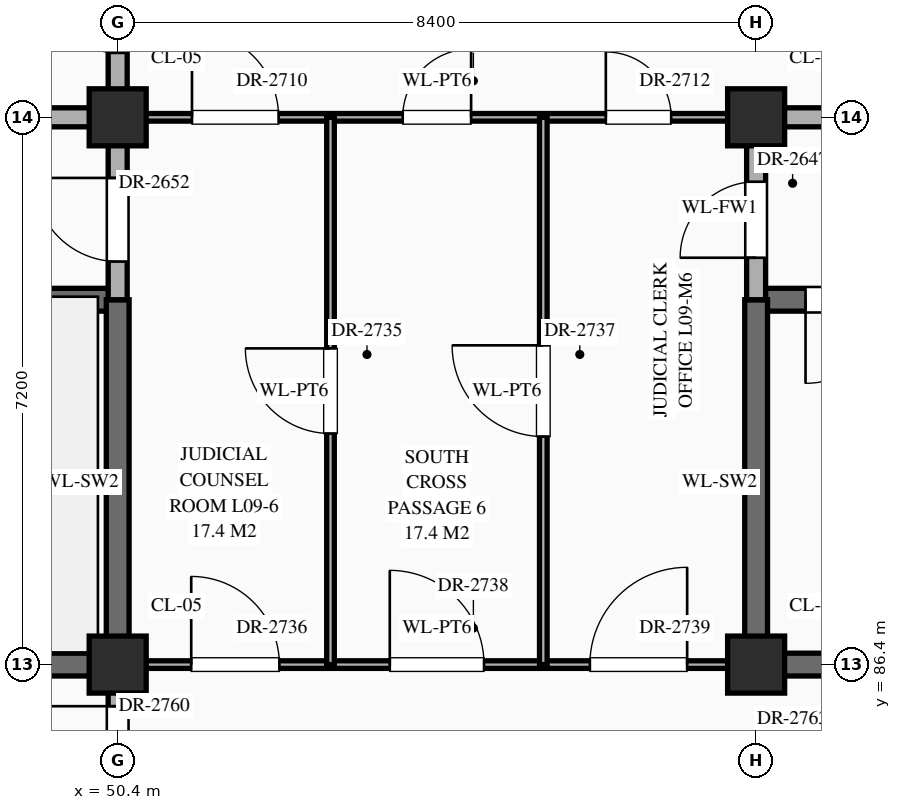
"""IFC4 building model, lengths in metres.
Left out: names, types, materials, properties, quantities, classifications, styles, units other than length and angle.
Written with IfcOpenShell. Run it as: python <this file> out.ifc"""

import sys

from ifc_helpers import new_model, si_unit, direction, frame, frame_2d, origin, origin_2d, place, context, subcontext, project, spatial, rectangle, extrude, element, fill, save


model = new_model("IFC4")
c1 = context("Model", 3, precision=1e-05, world=origin(), true_north=direction((0.0, 1.0)))
c2 = subcontext(c1, "Body", "Model", "MODEL_VIEW")
j1 = project(units=[si_unit("LENGTHUNIT", "METRE"), si_unit("PLANEANGLEUNIT", "RADIAN")], contexts=[c1])
p1 = place(None, origin())
s1 = spatial("IfcSite", under=j1, at=p1, CompositionType="ELEMENT")
p2 = place(p1, origin())
s2 = spatial("IfcBuilding", under=s1, at=p2, CompositionType="ELEMENT")
p3 = place(p2, frame((0.0, 0.0, 39.3)))
s3 = spatial("IfcBuildingStorey", under=s2, at=p3, CompositionType="ELEMENT", Elevation=39.3)
for number, where, z_axis, x_axis in (
    (1, (50.4, 86.4, 0.0), (0.0, 0.0, 1.0), (1.0, 0.0, 0.0)),
    (2, (50.4, 93.6, 0.0), (0.0, 0.0, 1.0), (1.0, 0.0, 0.0)),
    (3, (58.8, 86.4, 0.0), (0.0, 0.0, 1.0), (1.0, 0.0, 0.0)),
    (4, (58.8, 93.6, 0.0), (0.0, 0.0, 1.0), (1.0, 0.0, 0.0)),
):
    element("IfcColumn", number, at=place(p3, frame(where, z_axis=z_axis, x_axis=x_axis)), inside=s3, PredefinedType="COLUMN", context=c2, shape_type="SweptSolid", body=[
        extrude(rectangle(XDim=0.75, YDim=0.75, at=origin_2d()), origin(), (0.0, 0.0, 1.0), 4.2),
    ])
p4 = place(p3, frame((42.04, 86.4, 0.0), z_axis=(0.0, 0.0, 1.0), x_axis=(1.0, 0.0, 0.0)))
e5 = element("IfcWall", 5, at=p4, inside=s3, PredefinedType="SHEAR", context=c2, shape_type="SweptSolid", body=[
    extrude(rectangle(XDim=8.36, YDim=0.3, at=frame_2d((4.18, 0.0))), origin(), (0.0, 0.0, 1.0), 3.95),
])
p5 = place(p3, frame((50.4, 86.4, 0.0), z_axis=(0.0, 0.0, 1.0), x_axis=(1.0, 0.0, 0.0)))
e6 = element("IfcWall", 6, at=p5, inside=s3, PredefinedType="STANDARD", context=c2, shape_type="SweptSolid", body=[
    extrude(rectangle(XDim=8.4, YDim=0.1, at=frame_2d((4.2, 0.0))), origin(), (0.0, 0.0, 1.0), 3.1),
])
p6 = place(p5, frame((0.968, 0.0, 0.0)))
e7 = element("IfcOpeningElement", 7, at=p6, cuts=e6, PredefinedType="OPENING", context=c2, shape_type="SweptSolid", body=[
    extrude(rectangle(XDim=1.16, YDim=2.3, at=frame_2d((0.58, 1.15))), frame((0.0, 0.062, 0.0), z_axis=(0.0, -1.0, 0.0), x_axis=(1.0, 0.0, 0.0)), (0.0, 0.0, 1.0), 0.124),
])
p7 = place(p5, frame((3.58, 0.0, 0.0)))
e8 = element("IfcOpeningElement", 8, at=p7, cuts=e6, PredefinedType="OPENING", context=c2, shape_type="SweptSolid", body=[
    extrude(rectangle(XDim=1.24, YDim=2.3, at=frame_2d((0.62, 1.15))), frame((0.0, 0.062, 0.0), z_axis=(0.0, -1.0, 0.0), x_axis=(1.0, 0.0, 0.0)), (0.0, 0.0, 1.0), 0.124),
])
p8 = place(p5, frame((6.212, 0.0, 0.0)))
e9 = element("IfcOpeningElement", 9, at=p8, cuts=e6, PredefinedType="OPENING", context=c2, shape_type="SweptSolid", body=[
    extrude(rectangle(XDim=1.28, YDim=2.35, at=frame_2d((0.64, 1.175))), frame((0.0, 0.062, 0.0), z_axis=(0.0, -1.0, 0.0), x_axis=(1.0, 0.0, 0.0)), (0.0, 0.0, 1.0), 0.124),
])
p9 = place(p3, frame((58.8, 86.4, 0.0), z_axis=(0.0, 0.0, 1.0), x_axis=(1.0, 0.0, 0.0)))
e10 = element("IfcWall", 10, at=p9, inside=s3, PredefinedType="SHEAR", context=c2, shape_type="SweptSolid", body=[
    extrude(rectangle(XDim=8.4, YDim=0.3, at=frame_2d((4.2, 0.0))), origin(), (0.0, 0.0, 1.0), 3.95),
])
p10 = place(p3, frame((42.04, 91.2, 0.0), z_axis=(0.0, 0.0, 1.0), x_axis=(1.0, 0.0, 0.0)))
e11 = element("IfcWall", 11, at=p10, inside=s3, PredefinedType="SHEAR", context=c2, shape_type="SweptSolid", body=[
    extrude(rectangle(XDim=8.36, YDim=0.3, at=frame_2d((4.18, 0.0))), origin(), (0.0, 0.0, 1.0), 3.95),
])
p11 = place(p10, frame((0.61, 0.0, 0.0)))
e12 = element("IfcOpeningElement", 12, at=p11, cuts=e11, PredefinedType="OPENING", context=c2, shape_type="SweptSolid", body=[
    extrude(rectangle(XDim=1.1, YDim=2.2, at=frame_2d((0.55, 1.1))), frame((0.0, 0.162, 0.0), z_axis=(0.0, -1.0, 0.0), x_axis=(1.0, 0.0, 0.0)), (0.0, 0.0, 1.0), 0.324),
])
p12 = place(p3, frame((58.8, 91.2, 0.0), z_axis=(0.0, 0.0, 1.0), x_axis=(1.0, 0.0, 0.0)))
e13 = element("IfcWall", 13, at=p12, inside=s3, PredefinedType="SHEAR", context=c2, shape_type="SweptSolid", body=[
    extrude(rectangle(XDim=8.4, YDim=0.3, at=frame_2d((4.2, 0.0))), origin(), (0.0, 0.0, 1.0), 3.95),
])
p13 = place(p12, frame((0.65, 0.0, 0.0)))
e14 = element("IfcOpeningElement", 14, at=p13, cuts=e13, PredefinedType="OPENING", context=c2, shape_type="SweptSolid", body=[
    extrude(rectangle(XDim=1.1, YDim=2.2, at=frame_2d((0.55, 1.1))), frame((0.0, 0.162, 0.0), z_axis=(0.0, -1.0, 0.0), x_axis=(1.0, 0.0, 0.0)), (0.0, 0.0, 1.0), 0.324),
])
p14 = place(p3, frame((42.04, 93.6, 0.0), z_axis=(0.0, 0.0, 1.0), x_axis=(1.0, 0.0, 0.0)))
e15 = element("IfcWall", 15, at=p14, inside=s3, PredefinedType="STANDARD", context=c2, shape_type="SweptSolid", body=[
    extrude(rectangle(XDim=8.36, YDim=0.25, at=frame_2d((4.18, 0.0))), origin(), (0.0, 0.0, 1.0), 3.1),
])
p15 = place(p14, frame((3.36, 0.0, 0.0)))
e16 = element("IfcOpeningElement", 16, at=p15, cuts=e15, PredefinedType="OPENING", context=c2, shape_type="SweptSolid", body=[
    extrude(rectangle(XDim=1.6, YDim=2.3, at=frame_2d((0.8, 1.15))), frame((0.0, 0.137, 0.0), z_axis=(0.0, -1.0, 0.0), x_axis=(1.0, 0.0, 0.0)), (0.0, 0.0, 1.0), 0.274),
])
p16 = place(p3, frame((50.4, 93.6, 0.0), z_axis=(0.0, 0.0, 1.0), x_axis=(1.0, 0.0, 0.0)))
e17 = element("IfcWall", 17, at=p16, inside=s3, PredefinedType="STANDARD", context=c2, shape_type="SweptSolid", body=[
    extrude(rectangle(XDim=8.4, YDim=0.1, at=frame_2d((4.2, 0.0))), origin(), (0.0, 0.0, 1.0), 3.1),
])
p17 = place(p16, frame((0.978, 0.0, 0.0)))
e18 = element("IfcOpeningElement", 18, at=p17, cuts=e17, PredefinedType="OPENING", context=c2, shape_type="SweptSolid", body=[
    extrude(rectangle(XDim=1.14, YDim=2.4, at=frame_2d((0.57, 1.2))), frame((0.0, 0.062, 0.0), z_axis=(0.0, -1.0, 0.0), x_axis=(1.0, 0.0, 0.0)), (0.0, 0.0, 1.0), 0.124),
])
p18 = place(p16, frame((3.75, 0.0, 0.0)))
e19 = element("IfcOpeningElement", 19, at=p18, cuts=e17, PredefinedType="OPENING", context=c2, shape_type="SweptSolid", body=[
    extrude(rectangle(XDim=0.9, YDim=2.15, at=frame_2d((0.45, 1.075))), frame((0.0, 0.062, 0.0), z_axis=(0.0, -1.0, 0.0), x_axis=(1.0, 0.0, 0.0)), (0.0, 0.0, 1.0), 0.124),
])
p19 = place(p16, frame((6.423, 0.0, 0.0)))
e20 = element("IfcOpeningElement", 20, at=p19, cuts=e17, PredefinedType="OPENING", context=c2, shape_type="SweptSolid", body=[
    extrude(rectangle(XDim=0.86, YDim=2.1, at=frame_2d((0.43, 1.05))), frame((0.0, 0.062, 0.0), z_axis=(0.0, -1.0, 0.0), x_axis=(1.0, 0.0, 0.0)), (0.0, 0.0, 1.0), 0.124),
])
p20 = place(p3, frame((58.8, 93.6, 0.0), z_axis=(0.0, 0.0, 1.0), x_axis=(1.0, 0.0, 0.0)))
e21 = element("IfcWall", 21, at=p20, inside=s3, PredefinedType="STANDARD", context=c2, shape_type="SweptSolid", body=[
    extrude(rectangle(XDim=8.4, YDim=0.25, at=frame_2d((4.2, 0.0))), origin(), (0.0, 0.0, 1.0), 3.1),
])
p21 = place(p20, frame((3.2, 0.0, 0.0)))
e22 = element("IfcOpeningElement", 22, at=p21, cuts=e21, PredefinedType="OPENING", context=c2, shape_type="SweptSolid", body=[
    extrude(rectangle(XDim=2.0, YDim=2.4, at=frame_2d((1.0, 1.2))), frame((0.0, 0.137, 0.0), z_axis=(0.0, -1.0, 0.0), x_axis=(1.0, 0.0, 0.0)), (0.0, 0.0, 1.0), 0.274),
])
p22 = place(p3, frame((50.4, 79.24, 0.0), z_axis=(0.0, 0.0, 1.0), x_axis=(0.0, 1.0, 0.0)))
e23 = element("IfcWall", 23, at=p22, inside=s3, PredefinedType="STANDARD", context=c2, shape_type="SweptSolid", body=[
    extrude(rectangle(XDim=7.16, YDim=0.25, at=frame_2d((3.58, 0.0))), origin(), (0.0, 0.0, 1.0), 3.2),
])
p23 = place(p22, frame((5.663, 0.0, 0.0)))
e24 = element("IfcOpeningElement", 24, at=p23, cuts=e23, PredefinedType="OPENING", context=c2, shape_type="SweptSolid", body=[
    extrude(rectangle(XDim=0.95, YDim=2.15, at=frame_2d((0.475, 1.075))), frame((0.0, 0.137, 0.0), z_axis=(0.0, -1.0, 0.0), x_axis=(1.0, 0.0, 0.0)), (0.0, 0.0, 1.0), 0.274),
])
p24 = place(p22, frame((2.083, 0.0, 0.0)))
e25 = element("IfcOpeningElement", 25, at=p24, cuts=e23, PredefinedType="OPENING", context=c2, shape_type="SweptSolid", body=[
    extrude(rectangle(XDim=1.5, YDim=2.25, at=frame_2d((0.75, 1.125))), frame((0.0, 0.137, 0.0), z_axis=(0.0, -1.0, 0.0), x_axis=(1.0, 0.0, 0.0)), (0.0, 0.0, 1.0), 0.274),
])
p25 = place(p3, frame((50.4, 86.4, 0.0), z_axis=(0.0, 0.0, 1.0), x_axis=(0.0, 1.0, 0.0)))
e26 = element("IfcWall", 26, at=p25, inside=s3, PredefinedType="SHEAR", context=c2, shape_type="SweptSolid", body=[
    extrude(rectangle(XDim=4.8, YDim=0.3, at=frame_2d((2.4, 0.0))), origin(), (0.0, 0.0, 1.0), 3.95),
])
p26 = place(p3, frame((50.4, 91.2, 0.0), z_axis=(0.0, 0.0, 1.0), x_axis=(0.0, 1.0, 0.0)))
e27 = element("IfcWall", 27, at=p26, inside=s3, PredefinedType="STANDARD", context=c2, shape_type="SweptSolid", body=[
    extrude(rectangle(XDim=13.2, YDim=0.25, at=frame_2d((6.6, 0.0))), origin(), (0.0, 0.0, 1.0), 3.2),
])
p27 = place(p26, frame((0.502, 0.0, 0.0)))
e28 = element("IfcOpeningElement", 28, at=p27, cuts=e27, PredefinedType="OPENING", context=c2, shape_type="SweptSolid", body=[
    extrude(rectangle(XDim=1.1, YDim=2.2, at=frame_2d((0.55, 1.1))), frame((0.0, 0.137, 0.0), z_axis=(0.0, -1.0, 0.0), x_axis=(1.0, 0.0, 0.0)), (0.0, 0.0, 1.0), 0.274),
])
p28 = place(p26, frame((10.397, 0.0, 0.0)))
e29 = element("IfcOpeningElement", 29, at=p28, cuts=e27, PredefinedType="OPENING", context=c2, shape_type="SweptSolid", body=[
    extrude(rectangle(XDim=1.1, YDim=2.2, at=frame_2d((0.55, 1.1))), frame((0.0, 0.137, 0.0), z_axis=(0.0, -1.0, 0.0), x_axis=(1.0, 0.0, 0.0)), (0.0, 0.0, 1.0), 0.274),
])
p29 = place(p26, frame((3.248, 0.0, 0.0)))
e30 = element("IfcOpeningElement", 30, at=p29, cuts=e27, PredefinedType="OPENING", context=c2, shape_type="SweptSolid", body=[
    extrude(rectangle(XDim=1.0, YDim=2.2, at=frame_2d((0.5, 1.1))), frame((0.0, 0.137, 0.0), z_axis=(0.0, -1.0, 0.0), x_axis=(1.0, 0.0, 0.0)), (0.0, 0.0, 1.0), 0.274),
])
p30 = place(p3, frame((53.2, 86.4, 0.0), z_axis=(0.0, 0.0, 1.0), x_axis=(0.0, 1.0, 0.0)))
e31 = element("IfcWall", 31, at=p30, inside=s3, PredefinedType="STANDARD", context=c2, shape_type="SweptSolid", body=[
    extrude(rectangle(XDim=7.2, YDim=0.1, at=frame_2d((3.6, 0.0))), origin(), (0.0, 0.0, 1.0), 3.95),
])
p31 = place(p30, frame((3.04, 0.0, 0.0)))
e32 = element("IfcOpeningElement", 32, at=p31, cuts=e31, PredefinedType="OPENING", context=c2, shape_type="SweptSolid", body=[
    extrude(rectangle(XDim=1.12, YDim=2.25, at=frame_2d((0.56, 1.125))), frame((0.0, 0.062, 0.0), z_axis=(0.0, -1.0, 0.0), x_axis=(1.0, 0.0, 0.0)), (0.0, 0.0, 1.0), 0.124),
])
p32 = place(p3, frame((56.0, 86.4, 0.0), z_axis=(0.0, 0.0, 1.0), x_axis=(0.0, 1.0, 0.0)))
e33 = element("IfcWall", 33, at=p32, inside=s3, PredefinedType="STANDARD", context=c2, shape_type="SweptSolid", body=[
    extrude(rectangle(XDim=7.2, YDim=0.1, at=frame_2d((3.6, 0.0))), origin(), (0.0, 0.0, 1.0), 3.95),
])
p33 = place(p32, frame((3.0, 0.0, 0.0)))
e34 = element("IfcOpeningElement", 34, at=p33, cuts=e33, PredefinedType="OPENING", context=c2, shape_type="SweptSolid", body=[
    extrude(rectangle(XDim=1.2, YDim=2.35, at=frame_2d((0.6, 1.175))), frame((0.0, 0.062, 0.0), z_axis=(0.0, -1.0, 0.0), x_axis=(1.0, 0.0, 0.0)), (0.0, 0.0, 1.0), 0.124),
])
p34 = place(p3, frame((58.8, 86.4, 0.0), z_axis=(0.0, 0.0, 1.0), x_axis=(0.0, 1.0, 0.0)))
e35 = element("IfcWall", 35, at=p34, inside=s3, PredefinedType="SHEAR", context=c2, shape_type="SweptSolid", body=[
    extrude(rectangle(XDim=4.8, YDim=0.3, at=frame_2d((2.4, 0.0))), origin(), (0.0, 0.0, 1.0), 3.95),
])
p35 = place(p3, frame((58.8, 91.2, 0.0), z_axis=(0.0, 0.0, 1.0), x_axis=(0.0, 1.0, 0.0)))
e36 = element("IfcWall", 36, at=p35, inside=s3, PredefinedType="STANDARD", context=c2, shape_type="SweptSolid", body=[
    extrude(rectangle(XDim=2.4, YDim=0.25, at=frame_2d((1.2, 0.0))), origin(), (0.0, 0.0, 1.0), 3.2),
])
p36 = place(p35, frame((0.552, 0.0, 0.0)))
e37 = element("IfcOpeningElement", 37, at=p36, cuts=e36, PredefinedType="OPENING", context=c2, shape_type="SweptSolid", body=[
    extrude(rectangle(XDim=1.0, YDim=2.2, at=frame_2d((0.5, 1.1))), frame((0.0, 0.137, 0.0), z_axis=(0.0, -1.0, 0.0), x_axis=(1.0, 0.0, 0.0)), (0.0, 0.0, 1.0), 0.274),
])
p37 = place(p13, frame((1.1, 0.0, 0.0), z_axis=(0.0, 0.0, 1.0), x_axis=(-1.0, 0.0, 0.0)))
e38 = element("IfcDoor", 38, at=p37, inside=s3, OperationType="SINGLE_SWING_RIGHT", PredefinedType="DOOR", context=c2, shape_type="SweptSolid", body=[
    extrude(rectangle(XDim=1.1, YDim=2.2, at=frame_2d((0.55, 1.1))), frame((0.0, 0.025, 0.0), z_axis=(0.0, -1.0, 0.0), x_axis=(1.0, 0.0, 0.0)), (0.0, 0.0, 1.0), 0.05),
])
fill(e14, e38)
p38 = place(p36, origin())
e39 = element("IfcDoor", 39, at=p38, inside=s3, OperationType="SINGLE_SWING_LEFT", PredefinedType="DOOR", context=c2, shape_type="SweptSolid", body=[
    extrude(rectangle(XDim=1.0, YDim=2.2, at=frame_2d((0.5, 1.1))), frame((0.0, 0.025, 0.0), z_axis=(0.0, -1.0, 0.0), x_axis=(1.0, 0.0, 0.0)), (0.0, 0.0, 1.0), 0.05),
])
fill(e37, e39)
p39 = place(p27, origin())
e40 = element("IfcDoor", 40, at=p39, inside=s3, OperationType="SINGLE_SWING_RIGHT", PredefinedType="DOOR", context=c2, shape_type="SweptSolid", body=[
    extrude(rectangle(XDim=1.1, YDim=2.2, at=frame_2d((0.55, 1.1))), frame((0.0, 0.025, 0.0), z_axis=(0.0, -1.0, 0.0), x_axis=(1.0, 0.0, 0.0)), (0.0, 0.0, 1.0), 0.05),
])
fill(e28, e40)
p40 = place(p29, origin())
e41 = element("IfcDoor", 41, at=p40, inside=s3, OperationType="SINGLE_SWING_RIGHT", PredefinedType="DOOR", context=c2, shape_type="SweptSolid", body=[
    extrude(rectangle(XDim=1.0, YDim=2.2, at=frame_2d((0.5, 1.1))), frame((0.0, 0.025, 0.0), z_axis=(0.0, -1.0, 0.0), x_axis=(1.0, 0.0, 0.0)), (0.0, 0.0, 1.0), 0.05),
])
fill(e30, e41)
p41 = place(p17, origin())
e42 = element("IfcDoor", 42, at=p41, inside=s3, OperationType="SINGLE_SWING_LEFT", PredefinedType="DOOR", context=c2, shape_type="SweptSolid", body=[
    extrude(rectangle(XDim=1.14, YDim=2.4, at=frame_2d((0.57, 1.2))), frame((0.0, 0.025, 0.0), z_axis=(0.0, -1.0, 0.0), x_axis=(1.0, 0.0, 0.0)), (0.0, 0.0, 1.0), 0.05),
])
fill(e18, e42)
p42 = place(p18, origin())
e43 = element("IfcDoor", 43, at=p42, inside=s3, OperationType="SINGLE_SWING_RIGHT", PredefinedType="DOOR", context=c2, shape_type="SweptSolid", body=[
    extrude(rectangle(XDim=0.9, YDim=2.15, at=frame_2d((0.45, 1.075))), frame((0.0, 0.025, 0.0), z_axis=(0.0, -1.0, 0.0), x_axis=(1.0, 0.0, 0.0)), (0.0, 0.0, 1.0), 0.05),
])
fill(e19, e43)
p43 = place(p19, origin())
e44 = element("IfcDoor", 44, at=p43, inside=s3, OperationType="SINGLE_SWING_LEFT", PredefinedType="DOOR", context=c2, shape_type="SweptSolid", body=[
    extrude(rectangle(XDim=0.86, YDim=2.1, at=frame_2d((0.43, 1.05))), frame((0.0, 0.025, 0.0), z_axis=(0.0, -1.0, 0.0), x_axis=(1.0, 0.0, 0.0)), (0.0, 0.0, 1.0), 0.05),
])
fill(e20, e44)
p44 = place(p31, origin())
e45 = element("IfcDoor", 45, at=p44, inside=s3, OperationType="SINGLE_SWING_RIGHT", PredefinedType="DOOR", context=c2, shape_type="SweptSolid", body=[
    extrude(rectangle(XDim=1.12, YDim=2.25, at=frame_2d((0.56, 1.125))), frame((0.0, 0.025, 0.0), z_axis=(0.0, -1.0, 0.0), x_axis=(1.0, 0.0, 0.0)), (0.0, 0.0, 1.0), 0.05),
])
fill(e32, e45)
p45 = place(p6, origin())
e46 = element("IfcDoor", 46, at=p45, inside=s3, OperationType="SINGLE_SWING_LEFT", PredefinedType="DOOR", context=c2, shape_type="SweptSolid", body=[
    extrude(rectangle(XDim=1.16, YDim=2.3, at=frame_2d((0.58, 1.15))), frame((0.0, 0.025, 0.0), z_axis=(0.0, -1.0, 0.0), x_axis=(1.0, 0.0, 0.0)), (0.0, 0.0, 1.0), 0.05),
])
fill(e7, e46)
p46 = place(p33, origin())
e47 = element("IfcDoor", 47, at=p46, inside=s3, OperationType="SINGLE_SWING_RIGHT", PredefinedType="DOOR", context=c2, shape_type="SweptSolid", body=[
    extrude(rectangle(XDim=1.2, YDim=2.35, at=frame_2d((0.6, 1.175))), frame((0.0, 0.025, 0.0), z_axis=(0.0, -1.0, 0.0), x_axis=(1.0, 0.0, 0.0)), (0.0, 0.0, 1.0), 0.05),
])
fill(e34, e47)
p47 = place(p7, origin())
e48 = element("IfcDoor", 48, at=p47, inside=s3, OperationType="SINGLE_SWING_LEFT", PredefinedType="DOOR", context=c2, shape_type="SweptSolid", body=[
    extrude(rectangle(XDim=1.24, YDim=2.3, at=frame_2d((0.62, 1.15))), frame((0.0, 0.025, 0.0), z_axis=(0.0, -1.0, 0.0), x_axis=(1.0, 0.0, 0.0)), (0.0, 0.0, 1.0), 0.05),
])
fill(e8, e48)
p48 = place(p8, origin())
e49 = element("IfcDoor", 49, at=p48, inside=s3, OperationType="SINGLE_SWING_RIGHT", PredefinedType="DOOR", context=c2, shape_type="SweptSolid", body=[
    extrude(rectangle(XDim=1.28, YDim=2.35, at=frame_2d((0.64, 1.175))), frame((0.0, 0.025, 0.0), z_axis=(0.0, -1.0, 0.0), x_axis=(1.0, 0.0, 0.0)), (0.0, 0.0, 1.0), 0.05),
])
fill(e9, e49)
p49 = place(p23, origin())
e50 = element("IfcDoor", 50, at=p49, inside=s3, OperationType="SINGLE_SWING_RIGHT", PredefinedType="DOOR", context=c2, shape_type="SweptSolid", body=[
    extrude(rectangle(XDim=0.95, YDim=2.15, at=frame_2d((0.475, 1.075))), frame((0.0, 0.025, 0.0), z_axis=(0.0, -1.0, 0.0), x_axis=(1.0, 0.0, 0.0)), (0.0, 0.0, 1.0), 0.05),
])
fill(e24, e50)
save(model, sys.argv[1])
